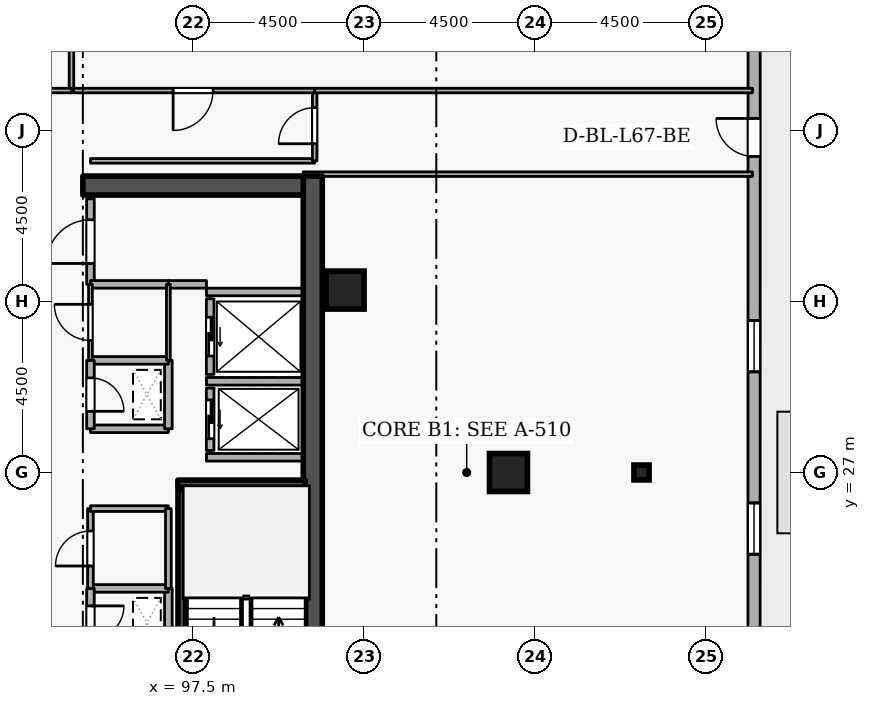
"""IFC4 building model, lengths in metres.
Left out: names, types, materials, properties, quantities, classifications, styles, units other than length and angle.
Written with IfcOpenShell. Run it as: python <this file> out.ifc"""

import sys

from ifc_helpers import new_model, si_unit, direction, frame, frame_2d, origin, origin_2d, place, context, subcontext, project, spatial, rectangle, i_section, extrude, element, fill, save


model = new_model("IFC4")
c1 = context("Model", 3, precision=1e-05, world=origin(), true_north=direction((0.0, 1.0)))
c2 = subcontext(c1, "Body", "Model", "MODEL_VIEW")
j1 = project(units=[si_unit("LENGTHUNIT", "METRE"), si_unit("PLANEANGLEUNIT", "RADIAN")], contexts=[c1])
p1 = place(None, origin())
s1 = spatial("IfcSite", under=j1, at=p1, CompositionType="ELEMENT")
p2 = place(p1, origin())
s2 = spatial("IfcBuilding", under=s1, at=p2, CompositionType="ELEMENT")
p3 = place(p2, frame((0.0, 0.0, 251.1)))
s3 = spatial("IfcBuildingStorey", under=s2, at=p3, CompositionType="ELEMENT", Elevation=251.1)
p4 = place(p3, frame((100.65, 19.2, 0.0), z_axis=(0.0, 0.0, 1.0), x_axis=(0.0, 1.0, 0.0)))
e1 = element("IfcWall", 1, at=p4, inside=s3, PredefinedType="SHEAR", context=c2, shape_type="SweptSolid", body=[
    extrude(rectangle(XDim=15.6, YDim=0.5, at=frame_2d((7.8, 0.0))), origin(), (0.0, 0.0, 1.0), 3.6),
])
p5 = place(p3, frame((94.6, 34.55, 0.0), z_axis=(0.0, 0.0, 1.0), x_axis=(1.0, 0.0, 0.0)))
e2 = element("IfcWall", 2, at=p5, inside=s3, PredefinedType="SHEAR", context=c2, shape_type="SweptSolid", body=[
    extrude(rectangle(XDim=5.8, YDim=0.5, at=frame_2d((2.9, 0.0))), origin(), (0.0, 0.0, 1.0), 3.6),
])
for number, where, z_axis, x_axis in (
    (3, (105.8, 27.0, 0.0), (0.0, 0.0, 1.0), (1.0, 0.0, 0.0)),
    (4, (101.5, 31.8, 0.0), (0.0, 0.0, 1.0), (1.0, 0.0, 0.0)),
):
    element("IfcColumn", number, at=place(p3, frame(where, z_axis=z_axis, x_axis=x_axis)), inside=s3, PredefinedType="COLUMN", context=c2, shape_type="SweptSolid", body=[
        extrude(rectangle(XDim=1.0, YDim=1.0, at=origin_2d()), origin(), (0.0, 0.0, 1.0), 3.6),
    ])
p6 = place(p3, frame((109.3, 27.0, 0.0), z_axis=(0.0, 0.0, 1.0), x_axis=(1.0, 0.0, 0.0)))
e5 = element("IfcColumn", 5, at=p6, inside=s3, PredefinedType="COLUMN", context=c2, shape_type="SweptSolid", body=[
    extrude(i_section(OverallWidth=0.399, OverallDepth=0.394, WebThickness=0.023, FlangeThickness=0.037, FilletRadius=0.015, at=origin_2d()), origin(), (0.0, 0.0, 1.0), 3.6),
])
p7 = place(p3, frame((112.258, 7.749, 0.0), z_axis=(0.0, 0.0, 1.0), x_axis=(0.000184351399, 0.999999983007, 0.0)))
e6 = element("IfcWall", 6, at=p7, inside=s3, PredefinedType="STANDARD", context=c2, shape_type="SweptSolid", body=[
    extrude(rectangle(XDim=34.432, YDim=0.32, at=frame_2d((17.216, 0.0))), origin(), (0.0, 0.0, 1.0), 2.22),
])
p8 = place(p7, frame((27.566, 0.0, 0.0)))
e7 = element("IfcOpeningElement", 7, at=p8, cuts=e6, PredefinedType="OPENING", context=c2, shape_type="SweptSolid", body=[
    extrude(rectangle(XDim=1.0, YDim=2.08, at=frame_2d((0.5, 1.04))), frame((0.0, 0.17, 0.0), z_axis=(0.0, -1.0, 0.0), x_axis=(1.0, 0.0, 0.0)), (0.0, 0.0, 1.0), 0.34),
])
p9 = place(p7, frame((2.7, 0.0, 0.72)))
e8 = element("IfcOpeningElement", 8, at=p9, cuts=e6, PredefinedType="OPENING", context=c2, shape_type="SweptSolid", body=[
    extrude(rectangle(XDim=1.35, YDim=1.05, at=frame_2d((0.675, 0.525))), frame((0.0, 0.17, 0.0), z_axis=(0.0, -1.0, 0.0), x_axis=(1.0, 0.0, 0.0)), (0.0, 0.0, 1.0), 0.34),
])
p10 = place(p7, frame((12.3, 0.0, 0.72)))
e9 = element("IfcOpeningElement", 9, at=p10, cuts=e6, PredefinedType="OPENING", context=c2, shape_type="SweptSolid", body=[
    extrude(rectangle(XDim=1.35, YDim=1.05, at=frame_2d((0.675, 0.525))), frame((0.0, 0.17, 0.0), z_axis=(0.0, -1.0, 0.0), x_axis=(1.0, 0.0, 0.0)), (0.0, 0.0, 1.0), 0.34),
])
p11 = place(p7, frame((17.1, 0.0, 0.72)))
e10 = element("IfcOpeningElement", 10, at=p11, cuts=e6, PredefinedType="OPENING", context=c2, shape_type="SweptSolid", body=[
    extrude(rectangle(XDim=1.35, YDim=1.05, at=frame_2d((0.675, 0.525))), frame((0.0, 0.17, 0.0), z_axis=(0.0, -1.0, 0.0), x_axis=(1.0, 0.0, 0.0)), (0.0, 0.0, 1.0), 0.34),
])
p12 = place(p7, frame((21.9, 0.0, 0.72)))
e11 = element("IfcOpeningElement", 11, at=p12, cuts=e6, PredefinedType="OPENING", context=c2, shape_type="SweptSolid", body=[
    extrude(rectangle(XDim=1.35, YDim=1.05, at=frame_2d((0.675, 0.525))), frame((0.0, 0.17, 0.0), z_axis=(0.0, -1.0, 0.0), x_axis=(1.0, 0.0, 0.0)), (0.0, 0.0, 1.0), 0.34),
])
p13 = place(p3, frame((97.95, 29.22, 0.0), z_axis=(0.0, 0.0, 1.0), x_axis=(0.0, -1.0, 0.0)))
e12 = element("IfcWall", 12, at=p13, inside=s3, PredefinedType="STANDARD", context=c2, shape_type="SweptSolid", body=[
    extrude(rectangle(XDim=1.64, YDim=0.2, at=frame_2d((0.82, 0.0))), origin(), (0.0, 0.0, 1.0), 3.32),
])
p14 = place(p13, frame((0.31, 0.0, 0.0)))
e13 = element("IfcOpeningElement", 13, at=p14, cuts=e12, PredefinedType="OPENING", context=c2, shape_type="SweptSolid", body=[
    extrude(rectangle(XDim=1.02, YDim=2.06, at=frame_2d((0.51, 1.03))), frame((0.0, 0.11, 0.0), z_axis=(0.0, -1.0, 0.0), x_axis=(1.0, 0.0, 0.0)), (0.0, 0.0, 1.0), 0.22),
])
p15 = place(p3, frame((97.95, 31.57, 0.0), z_axis=(0.0, 0.0, 1.0), x_axis=(0.0, -1.0, 0.0)))
e14 = element("IfcWall", 14, at=p15, inside=s3, PredefinedType="STANDARD", context=c2, shape_type="SweptSolid", body=[
    extrude(rectangle(XDim=1.99, YDim=0.2, at=frame_2d((0.995, 0.0))), origin(), (0.0, 0.0, 1.0), 3.32),
])
p16 = place(p15, frame((0.485, 0.0, 0.0)))
e15 = element("IfcOpeningElement", 15, at=p16, cuts=e14, PredefinedType="OPENING", context=c2, shape_type="SweptSolid", body=[
    extrude(rectangle(XDim=1.02, YDim=2.06, at=frame_2d((0.51, 1.03))), frame((0.0, 0.11, 0.0), z_axis=(0.0, -1.0, 0.0), x_axis=(1.0, 0.0, 0.0)), (0.0, 0.0, 1.0), 0.22),
])
p17 = place(p3, frame((97.852, 29.4, 0.0), z_axis=(0.0, 0.0, 1.0), x_axis=(1.0, 0.0, 0.0)))
e16 = element("IfcWall", 16, at=p17, inside=s3, PredefinedType="STANDARD", context=c2, shape_type="SweptSolid", body=[
    extrude(rectangle(XDim=2.536, YDim=0.2, at=frame_2d((1.268, 0.0))), origin(), (0.0, 0.0, 1.0), 3.32),
])
p18 = place(p3, frame((97.852, 27.4, 0.0), z_axis=(0.0, 0.0, 1.0), x_axis=(1.0, 0.0, 0.0)))
e17 = element("IfcWall", 17, at=p18, inside=s3, PredefinedType="STANDARD", context=c2, shape_type="SweptSolid", body=[
    extrude(rectangle(XDim=2.536, YDim=0.2, at=frame_2d((1.268, 0.0))), origin(), (0.0, 0.0, 1.0), 1.785),
])
p19 = place(p3, frame((97.852, 31.75, 0.0), z_axis=(0.0, 0.0, 1.0), x_axis=(1.0, 0.0, 0.0)))
e18 = element("IfcWall", 18, at=p19, inside=s3, PredefinedType="STANDARD", context=c2, shape_type="SweptSolid", body=[
    extrude(rectangle(XDim=2.536, YDim=0.2, at=frame_2d((1.268, 0.0))), origin(), (0.0, 0.0, 1.0), 3.32),
])
p20 = place(p3, frame((97.1, 26.7, 0.0), z_axis=(0.0, 0.0, 1.0), x_axis=(1.0, 0.0, 0.0)))
e19 = element("IfcWall", 19, at=p20, inside=s3, PredefinedType="SHEAR", context=c2, shape_type="SweptSolid", body=[
    extrude(rectangle(XDim=3.35, YDim=0.2, at=frame_2d((1.675, 0.0))), origin(), (0.0, 0.0, 1.0), 3.6),
])
p21 = place(p3, frame((97.203, 26.55, 0.0), z_axis=(0.0, 0.0, 1.0), x_axis=(0.0, -1.0, 0.0)))
e20 = element("IfcWall", 20, at=p21, inside=s3, PredefinedType="SHEAR", context=c2, shape_type="SweptSolid", body=[
    extrude(rectangle(XDim=7.1, YDim=0.2, at=frame_2d((3.55, 0.0))), origin(), (0.0, 0.0, 1.0), 3.6),
])
p22 = place(p3, frame((94.8, 28.15, 0.0), z_axis=(0.0, 0.0, 1.0), x_axis=(1.0, 0.0, 0.0)))
e21 = element("IfcWall", 21, at=p22, inside=s3, PredefinedType="STANDARD", context=c2, shape_type="SweptSolid", body=[
    extrude(rectangle(XDim=2.05, YDim=0.2, at=frame_2d((1.025, 0.0))), origin(), (0.0, 0.0, 1.0), 3.32),
])
p23 = place(p3, frame((96.85, 28.15, 0.0), z_axis=(0.0, 0.0, 1.0), x_axis=(0.0, 1.0, 0.0)))
e22 = element("IfcWall", 22, at=p23, inside=s3, PredefinedType="STANDARD", context=c2, shape_type="SweptSolid", body=[
    extrude(rectangle(XDim=1.8, YDim=0.2, at=frame_2d((0.9, 0.0))), origin(), (0.0, 0.0, 1.0), 3.32),
])
p24 = place(p3, frame((96.85, 29.95, 0.0), z_axis=(0.0, 0.0, 1.0), x_axis=(-1.0, 0.0, 0.0)))
e23 = element("IfcWall", 23, at=p24, inside=s3, PredefinedType="STANDARD", context=c2, shape_type="SweptSolid", body=[
    extrude(rectangle(XDim=2.05, YDim=0.2, at=frame_2d((1.025, 0.0))), origin(), (0.0, 0.0, 1.0), 3.32),
])
p25 = place(p3, frame((94.8, 29.95, 0.0), z_axis=(0.0, 0.0, 1.0), x_axis=(0.0, -1.0, 0.0)))
e24 = element("IfcWall", 24, at=p25, inside=s3, PredefinedType="STANDARD", context=c2, shape_type="SweptSolid", body=[
    extrude(rectangle(XDim=1.8, YDim=0.2, at=frame_2d((0.9, 0.0))), origin(), (0.0, 0.0, 1.0), 3.32),
])
p26 = place(p25, frame((0.46, 0.0, 0.0)))
e25 = element("IfcOpeningElement", 25, at=p26, cuts=e24, PredefinedType="OPENING", context=c2, shape_type="SweptSolid", body=[
    extrude(rectangle(XDim=0.88, YDim=2.04, at=frame_2d((0.44, 1.02))), frame((0.0, 0.11, 0.0), z_axis=(0.0, -1.0, 0.0), x_axis=(1.0, 0.0, 0.0)), (0.0, 0.0, 1.0), 0.22),
])
p27 = place(p3, frame((96.85, 22.15, 0.0), z_axis=(0.0, 0.0, 1.0), x_axis=(0.0, 1.0, 0.0)))
e26 = element("IfcWall", 26, at=p27, inside=s3, PredefinedType="STANDARD", context=c2, shape_type="SweptSolid", body=[
    extrude(rectangle(XDim=1.8, YDim=0.2, at=frame_2d((0.9, 0.0))), origin(), (0.0, 0.0, 1.0), 3.32),
])
p28 = place(p3, frame((96.85, 23.95, 0.0), z_axis=(0.0, 0.0, 1.0), x_axis=(-1.0, 0.0, 0.0)))
e27 = element("IfcWall", 27, at=p28, inside=s3, PredefinedType="STANDARD", context=c2, shape_type="SweptSolid", body=[
    extrude(rectangle(XDim=2.05, YDim=0.2, at=frame_2d((1.025, 0.0))), origin(), (0.0, 0.0, 1.0), 3.32),
])
p29 = place(p3, frame((94.8, 23.95, 0.0), z_axis=(0.0, 0.0, 1.0), x_axis=(0.0, -1.0, 0.0)))
e28 = element("IfcWall", 28, at=p29, inside=s3, PredefinedType="STANDARD", context=c2, shape_type="SweptSolid", body=[
    extrude(rectangle(XDim=1.8, YDim=0.2, at=frame_2d((0.9, 0.0))), origin(), (0.0, 0.0, 1.0), 3.32),
])
p30 = place(p29, frame((0.46, 0.0, 0.0)))
e29 = element("IfcOpeningElement", 29, at=p30, cuts=e28, PredefinedType="OPENING", context=c2, shape_type="SweptSolid", body=[
    extrude(rectangle(XDim=0.88, YDim=2.04, at=frame_2d((0.44, 1.02))), frame((0.0, 0.11, 0.0), z_axis=(0.0, -1.0, 0.0), x_axis=(1.0, 0.0, 0.0)), (0.0, 0.0, 1.0), 0.22),
])
p31 = place(p3, frame((94.8, 31.95, 0.0), z_axis=(0.0, 0.0, 1.0), x_axis=(0.0, 1.0, 0.0)))
e30 = element("IfcWall", 30, at=p31, inside=s3, PredefinedType="STANDARD", context=c2, shape_type="SweptSolid", body=[
    extrude(rectangle(XDim=2.25, YDim=0.2, at=frame_2d((1.125, 0.0))), origin(), (0.0, 0.0, 1.0), 3.32),
])
p32 = place(p31, frame((0.55, 0.0, 0.0)))
e31 = element("IfcOpeningElement", 31, at=p32, cuts=e30, PredefinedType="OPENING", context=c2, shape_type="SweptSolid", body=[
    extrude(rectangle(XDim=1.15, YDim=2.1, at=frame_2d((0.575, 1.05))), frame((0.0, 0.11, 0.0), z_axis=(0.0, -1.0, 0.0), x_axis=(1.0, 0.0, 0.0)), (0.0, 0.0, 1.0), 0.22),
])
p33 = place(p3, frame((97.852, 31.95, 0.0), z_axis=(0.0, 0.0, 1.0), x_axis=(-1.0, 0.0, 0.0)))
e32 = element("IfcWall", 32, at=p33, inside=s3, PredefinedType="STANDARD", context=c2, shape_type="SweptSolid", body=[
    extrude(rectangle(XDim=1.002, YDim=0.2, at=frame_2d((0.501, 0.0))), origin(), (0.0, 0.0, 1.0), 3.32),
])
p34 = place(p3, frame((96.85, 31.95, 0.0), z_axis=(0.0, 0.0, 1.0), x_axis=(-1.0, 0.0, 0.0)))
e33 = element("IfcWall", 33, at=p34, inside=s3, PredefinedType="STANDARD", context=c2, shape_type="SweptSolid", body=[
    extrude(rectangle(XDim=2.05, YDim=0.2, at=frame_2d((1.025, 0.0))), origin(), (0.0, 0.0, 1.0), 3.32),
])
p35 = place(p3, frame((94.8, 23.95, 0.0), z_axis=(0.0, 0.0, 1.0), x_axis=(0.0, 1.0, 0.0)))
e34 = element("IfcWall", 34, at=p35, inside=s3, PredefinedType="PARTITIONING", context=c2, shape_type="SweptSolid", body=[
    extrude(rectangle(XDim=2.1, YDim=0.15, at=frame_2d((1.05, 0.0))), origin(), (0.0, 0.0, 1.0), 3.32),
])
p36 = place(p35, frame((0.59, 0.0, 0.0)))
e35 = element("IfcOpeningElement", 35, at=p36, cuts=e34, PredefinedType="OPENING", context=c2, shape_type="SweptSolid", body=[
    extrude(rectangle(XDim=0.92, YDim=2.08, at=frame_2d((0.46, 1.04))), frame((0.0, 0.085, 0.0), z_axis=(0.0, -1.0, 0.0), x_axis=(1.0, 0.0, 0.0)), (0.0, 0.0, 1.0), 0.17),
])
p37 = place(p3, frame((94.8, 26.05, 0.0), z_axis=(0.0, 0.0, 1.0), x_axis=(1.0, 0.0, 0.0)))
e36 = element("IfcWall", 36, at=p37, inside=s3, PredefinedType="PARTITIONING", context=c2, shape_type="SweptSolid", body=[
    extrude(rectangle(XDim=2.05, YDim=0.15, at=frame_2d((1.025, 0.0))), origin(), (0.0, 0.0, 1.0), 3.32),
])
p38 = place(p3, frame((96.85, 26.05, 0.0), z_axis=(0.0, 0.0, 1.0), x_axis=(0.0, -1.0, 0.0)))
e37 = element("IfcWall", 37, at=p38, inside=s3, PredefinedType="PARTITIONING", context=c2, shape_type="SweptSolid", body=[
    extrude(rectangle(XDim=2.1, YDim=0.15, at=frame_2d((1.05, 0.0))), origin(), (0.0, 0.0, 1.0), 3.32),
])
p39 = place(p3, frame((94.8, 29.95, 0.0), z_axis=(0.0, 0.0, 1.0), x_axis=(0.0, 1.0, 0.0)))
e38 = element("IfcWall", 38, at=p39, inside=s3, PredefinedType="PARTITIONING", context=c2, shape_type="SweptSolid", body=[
    extrude(rectangle(XDim=2.0, YDim=0.1, at=frame_2d((1.0, 0.0))), origin(), (0.0, 0.0, 1.0), 3.32),
])
p40 = place(p39, frame((0.525, 0.0, 0.0)))
e39 = element("IfcOpeningElement", 39, at=p40, cuts=e38, PredefinedType="OPENING", context=c2, shape_type="SweptSolid", body=[
    extrude(rectangle(XDim=0.95, YDim=2.1, at=frame_2d((0.475, 1.05))), frame((0.0, 0.06, 0.0), z_axis=(0.0, -1.0, 0.0), x_axis=(1.0, 0.0, 0.0)), (0.0, 0.0, 1.0), 0.12),
])
p41 = place(p3, frame((96.85, 31.95, 0.0), z_axis=(0.0, 0.0, 1.0), x_axis=(0.0, -1.0, 0.0)))
e40 = element("IfcWall", 40, at=p41, inside=s3, PredefinedType="PARTITIONING", context=c2, shape_type="SweptSolid", body=[
    extrude(rectangle(XDim=2.0, YDim=0.1, at=frame_2d((1.0, 0.0))), origin(), (0.0, 0.0, 1.0), 3.32),
])
p42 = place(p3, frame((94.8, 35.2, 0.0), z_axis=(0.0, 0.0, 1.0), x_axis=(1.0, 0.0, 0.0)))
e41 = element("IfcWall", 41, at=p42, inside=s3, PredefinedType="PARTITIONING", context=c2, shape_type="SweptSolid", body=[
    extrude(rectangle(XDim=5.9, YDim=0.12, at=frame_2d((2.95, 0.0))), origin(), (0.0, 0.0, 1.0), 3.32),
])
p43 = place(p3, frame((100.7, 35.2, 0.0), z_axis=(0.0, 0.0, 1.0), x_axis=(0.0, 1.0, 0.0)))
e42 = element("IfcWall", 42, at=p43, inside=s3, PredefinedType="PARTITIONING", context=c2, shape_type="SweptSolid", body=[
    extrude(rectangle(XDim=1.85, YDim=0.12, at=frame_2d((0.925, 0.0))), origin(), (0.0, 0.0, 1.0), 3.32),
])
p44 = place(p43, frame((0.45, 0.0, 0.0)))
e43 = element("IfcOpeningElement", 43, at=p44, cuts=e42, PredefinedType="OPENING", context=c2, shape_type="SweptSolid", body=[
    extrude(rectangle(XDim=0.95, YDim=2.1, at=frame_2d((0.475, 1.05))), frame((0.0, 0.07, 0.0), z_axis=(0.0, -1.0, 0.0), x_axis=(1.0, 0.0, 0.0)), (0.0, 0.0, 1.0), 0.14),
])
p45 = place(p3, frame((100.7, 37.05, 0.0), z_axis=(0.0, 0.0, 1.0), x_axis=(1.0, 0.0, 0.0)))
e44 = element("IfcWall", 44, at=p45, inside=s3, PredefinedType="PARTITIONING", context=c2, shape_type="SweptSolid", body=[
    extrude(rectangle(XDim=11.52, YDim=0.12, at=frame_2d((5.76, 0.0))), origin(), (0.0, 0.0, 1.0), 3.32),
])
p46 = place(p3, frame((112.22, 34.85, 0.0), z_axis=(0.0, 0.0, 1.0), x_axis=(-1.0, 0.0, 0.0)))
e45 = element("IfcWall", 45, at=p46, inside=s3, PredefinedType="PARTITIONING", context=c2, shape_type="SweptSolid", body=[
    extrude(rectangle(XDim=11.82, YDim=0.12, at=frame_2d((5.91, 0.0))), origin(), (0.0, 0.0, 1.0), 2.525),
])
p47 = place(p3, frame((100.7, 37.05, 0.0), z_axis=(0.0, 0.0, 1.0), x_axis=(-1.0, 0.0, 0.0)))
e46 = element("IfcWall", 46, at=p47, inside=s3, PredefinedType="PARTITIONING", context=c2, shape_type="SweptSolid", body=[
    extrude(rectangle(XDim=6.4, YDim=0.12, at=frame_2d((3.2, 0.0))), origin(), (0.0, 0.0, 1.0), 3.32),
])
p48 = place(p47, frame((2.675, 0.0, 0.0)))
e47 = element("IfcOpeningElement", 47, at=p48, cuts=e46, PredefinedType="OPENING", context=c2, shape_type="SweptSolid", body=[
    extrude(rectangle(XDim=1.05, YDim=2.1, at=frame_2d((0.525, 1.05))), frame((0.0, 0.07, 0.0), z_axis=(0.0, -1.0, 0.0), x_axis=(1.0, 0.0, 0.0)), (0.0, 0.0, 1.0), 0.14),
])
p49 = place(p3, frame((94.3, 37.05, 0.0), z_axis=(0.0, 0.0, 1.0), x_axis=(0.0, 1.0, 0.0)))
e48 = element("IfcWall", 48, at=p49, inside=s3, PredefinedType="PARTITIONING", context=c2, shape_type="SweptSolid", body=[
    extrude(rectangle(XDim=7.67, YDim=0.12, at=frame_2d((3.835, 0.0))), origin(), (0.0, 0.0, 1.0), 3.32),
])
p50 = place(p3, frame((94.3, 37.05, 0.0), z_axis=(0.0, 0.0, 1.0), x_axis=(-1.0, 0.0, 0.0)))
e49 = element("IfcWall", 49, at=p50, inside=s3, PredefinedType="PARTITIONING", context=c2, shape_type="SweptSolid", body=[
    extrude(rectangle(XDim=5.4, YDim=0.12, at=frame_2d((2.7, 0.0))), origin(), (0.0, 0.0, 1.0), 3.32),
])
p51 = place(p50, frame((2.225, 0.0, 0.0)))
e50 = element("IfcOpeningElement", 50, at=p51, cuts=e49, PredefinedType="OPENING", context=c2, shape_type="SweptSolid", body=[
    extrude(rectangle(XDim=0.95, YDim=2.1, at=frame_2d((0.475, 1.05))), frame((0.0, 0.07, 0.0), z_axis=(0.0, -1.0, 0.0), x_axis=(1.0, 0.0, 0.0)), (0.0, 0.0, 1.0), 0.14),
])
p52 = place(p8, origin())
e51 = element("IfcDoor", 51, at=p52, inside=s3, OperationType="SINGLE_SWING_RIGHT", PredefinedType="DOOR", context=c2, shape_type="SweptSolid", body=[
    extrude(rectangle(XDim=1.0, YDim=2.08, at=frame_2d((0.5, 1.04))), frame((0.0, 0.025, 0.0), z_axis=(0.0, -1.0, 0.0), x_axis=(1.0, 0.0, 0.0)), (0.0, 0.0, 1.0), 0.05),
])
fill(e7, e51)
p53 = place(p11, origin())
e52 = element("IfcWindow", 52, at=p53, inside=s3, PartitioningType="SINGLE_PANEL", PredefinedType="WINDOW", context=c2, shape_type="SweptSolid", body=[
    extrude(rectangle(XDim=1.35, YDim=1.05, at=frame_2d((0.675, 0.525))), frame((0.0, 0.03, 0.0), z_axis=(0.0, -1.0, 0.0), x_axis=(1.0, 0.0, 0.0)), (0.0, 0.0, 1.0), 0.06),
])
fill(e10, e52)
p54 = place(p12, origin())
e53 = element("IfcWindow", 53, at=p54, inside=s3, PartitioningType="SINGLE_PANEL", PredefinedType="WINDOW", context=c2, shape_type="SweptSolid", body=[
    extrude(rectangle(XDim=1.35, YDim=1.05, at=frame_2d((0.675, 0.525))), frame((0.0, 0.03, 0.0), z_axis=(0.0, -1.0, 0.0), x_axis=(1.0, 0.0, 0.0)), (0.0, 0.0, 1.0), 0.06),
])
fill(e11, e53)
p55 = place(p14, origin())
e54 = element("IfcDoor", 54, at=p55, inside=s3, OperationType="SLIDING_TO_LEFT", PredefinedType="DOOR", context=c2, shape_type="SweptSolid", body=[
    extrude(rectangle(XDim=1.02, YDim=2.06, at=frame_2d((0.51, 1.03))), frame((0.0, 0.025, 0.0), z_axis=(0.0, -1.0, 0.0), x_axis=(1.0, 0.0, 0.0)), (0.0, 0.0, 1.0), 0.05),
])
fill(e13, e54)
p56 = place(p16, origin())
e55 = element("IfcDoor", 55, at=p56, inside=s3, OperationType="SLIDING_TO_LEFT", PredefinedType="DOOR", context=c2, shape_type="SweptSolid", body=[
    extrude(rectangle(XDim=1.02, YDim=2.06, at=frame_2d((0.51, 1.03))), frame((0.0, 0.025, 0.0), z_axis=(0.0, -1.0, 0.0), x_axis=(1.0, 0.0, 0.0)), (0.0, 0.0, 1.0), 0.05),
])
fill(e15, e55)
p57 = place(p26, origin())
e56 = element("IfcDoor", 56, at=p57, inside=s3, OperationType="SINGLE_SWING_RIGHT", PredefinedType="DOOR", context=c2, shape_type="SweptSolid", body=[
    extrude(rectangle(XDim=0.88, YDim=2.04, at=frame_2d((0.44, 1.02))), frame((0.0, 0.025, 0.0), z_axis=(0.0, -1.0, 0.0), x_axis=(1.0, 0.0, 0.0)), (0.0, 0.0, 1.0), 0.05),
])
fill(e25, e56)
p58 = place(p30, origin())
e57 = element("IfcDoor", 57, at=p58, inside=s3, OperationType="SINGLE_SWING_LEFT", PredefinedType="DOOR", context=c2, shape_type="SweptSolid", body=[
    extrude(rectangle(XDim=0.88, YDim=2.04, at=frame_2d((0.44, 1.02))), frame((0.0, 0.025, 0.0), z_axis=(0.0, -1.0, 0.0), x_axis=(1.0, 0.0, 0.0)), (0.0, 0.0, 1.0), 0.05),
])
fill(e29, e57)
p59 = place(p36, origin())
e58 = element("IfcDoor", 58, at=p59, inside=s3, OperationType="SINGLE_SWING_LEFT", PredefinedType="DOOR", context=c2, shape_type="SweptSolid", body=[
    extrude(rectangle(XDim=0.92, YDim=2.08, at=frame_2d((0.46, 1.04))), frame((0.0, 0.025, 0.0), z_axis=(0.0, -1.0, 0.0), x_axis=(1.0, 0.0, 0.0)), (0.0, 0.0, 1.0), 0.05),
])
fill(e35, e58)
p60 = place(p40, origin())
e59 = element("IfcDoor", 59, at=p60, inside=s3, OperationType="SINGLE_SWING_RIGHT", PredefinedType="DOOR", context=c2, shape_type="SweptSolid", body=[
    extrude(rectangle(XDim=0.95, YDim=2.1, at=frame_2d((0.475, 1.05))), frame((0.0, 0.025, 0.0), z_axis=(0.0, -1.0, 0.0), x_axis=(1.0, 0.0, 0.0)), (0.0, 0.0, 1.0), 0.05),
])
fill(e39, e59)
p61 = place(p32, origin())
e60 = element("IfcDoor", 60, at=p61, inside=s3, OperationType="SINGLE_SWING_LEFT", PredefinedType="DOOR", context=c2, shape_type="SweptSolid", body=[
    extrude(rectangle(XDim=1.15, YDim=2.1, at=frame_2d((0.575, 1.05))), frame((0.0, 0.025, 0.0), z_axis=(0.0, -1.0, 0.0), x_axis=(1.0, 0.0, 0.0)), (0.0, 0.0, 1.0), 0.05),
])
fill(e31, e60)
p62 = place(p44, origin())
e61 = element("IfcDoor", 61, at=p62, inside=s3, OperationType="SINGLE_SWING_LEFT", PredefinedType="DOOR", context=c2, shape_type="SweptSolid", body=[
    extrude(rectangle(XDim=0.95, YDim=2.1, at=frame_2d((0.475, 1.05))), frame((0.0, 0.025, 0.0), z_axis=(0.0, -1.0, 0.0), x_axis=(1.0, 0.0, 0.0)), (0.0, 0.0, 1.0), 0.05),
])
fill(e43, e61)
p63 = place(p48, origin())
e62 = element("IfcDoor", 62, at=p63, inside=s3, OperationType="SINGLE_SWING_RIGHT", PredefinedType="DOOR", context=c2, shape_type="SweptSolid", body=[
    extrude(rectangle(XDim=1.05, YDim=2.1, at=frame_2d((0.525, 1.05))), frame((0.0, 0.025, 0.0), z_axis=(0.0, -1.0, 0.0), x_axis=(1.0, 0.0, 0.0)), (0.0, 0.0, 1.0), 0.05),
])
fill(e47, e62)
save(model, sys.argv[1])
